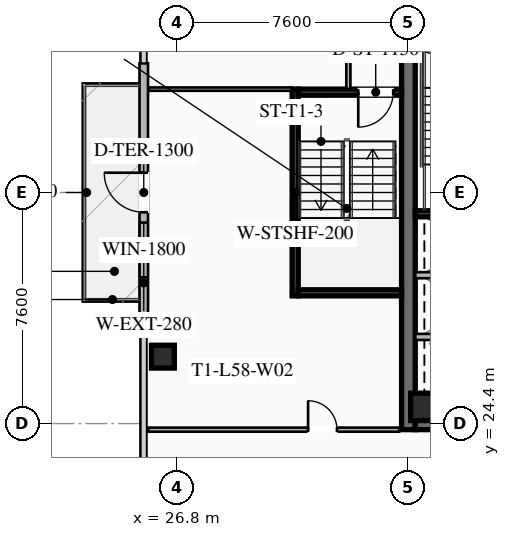
"""IFC4 building model, lengths in metres.
Left out: names, types, materials, properties, quantities, classifications, styles, units other than length and angle.
Written with IfcOpenShell. Run it as: python <this file> out.ifc"""

import sys

from ifc_helpers import new_model, si_unit, direction, frame, frame_2d, origin, origin_2d, place, context, subcontext, project, spatial, rectangle, hollow_rectangle, extrude, element, fill, save


model = new_model("IFC4")
c1 = context("Model", 3, precision=1e-05, world=origin(), true_north=direction((0.0, 1.0)))
c2 = subcontext(c1, "Body", "Model", "MODEL_VIEW")
j1 = project(units=[si_unit("LENGTHUNIT", "METRE"), si_unit("PLANEANGLEUNIT", "RADIAN")], contexts=[c1])
p1 = place(None, origin())
s1 = spatial("IfcSite", under=j1, at=p1, CompositionType="ELEMENT")
p2 = place(p1, origin())
s2 = spatial("IfcBuilding", under=s1, at=p2, CompositionType="ELEMENT")
p3 = place(p2, frame((0.0, 0.0, 214.85)))
s3 = spatial("IfcBuildingStorey", under=s2, at=p3, CompositionType="ELEMENT", Elevation=214.85)
p4 = place(p3, frame((34.425, 24.2, 0.0), z_axis=(0.0, 0.0, 1.0), x_axis=(0.0, 1.0, 0.0)))
e1 = element("IfcWall", 1, at=p4, inside=s3, PredefinedType="SHEAR", context=c2, shape_type="SweptSolid", body=[
    extrude(rectangle(XDim=15.6, YDim=0.45, at=frame_2d((7.8, 0.0))), origin(), (0.0, 0.0, 1.0), 3.55),
])
p5 = place(p3, frame((49.35, 24.425, 0.0), z_axis=(0.0, 0.0, 1.0), x_axis=(-1.0, 0.0, 0.0)))
e2 = element("IfcWall", 2, at=p5, inside=s3, PredefinedType="SHEAR", context=c2, shape_type="SweptSolid", body=[
    extrude(rectangle(XDim=14.7, YDim=0.45, at=frame_2d((7.35, 0.0))), origin(), (0.0, 0.0, 1.0), 3.55),
])
p6 = place(p5, frame((9.05, 0.0, 0.0)))
e3 = element("IfcOpeningElement", 3, at=p6, cuts=e2, PredefinedType="OPENING", context=c2, shape_type="SweptSolid", body=[
    extrude(rectangle(XDim=1.25, YDim=2.25, at=frame_2d((0.625, 1.125))), frame((0.0, 0.235, 0.0), z_axis=(0.0, -1.0, 0.0), x_axis=(1.0, 0.0, 0.0)), (0.0, 0.0, 1.0), 0.47),
])
p7 = place(p5, frame((4.0, 0.0, 0.0)))
e4 = element("IfcOpeningElement", 4, at=p7, cuts=e2, PredefinedType="OPENING", context=c2, shape_type="SweptSolid", body=[
    extrude(rectangle(XDim=1.25, YDim=2.25, at=frame_2d((0.625, 1.125))), frame((0.0, 0.235, 0.0), z_axis=(0.0, -1.0, 0.0), x_axis=(1.0, 0.0, 0.0)), (0.0, 0.0, 1.0), 0.47),
])
p8 = place(p3, frame((34.95, 24.95, 0.0), z_axis=(0.0, 0.0, 1.0), x_axis=(1.0, 0.0, 0.0)))
e5 = element("IfcColumn", 5, at=p8, inside=s3, PredefinedType="COLUMN", context=c2, shape_type="SweptSolid", body=[
    extrude(hollow_rectangle(XDim=0.9, YDim=0.9, WallThickness=0.04, at=origin_2d()), origin(), (0.0, 0.0, 1.0), 3.37),
])
p9 = place(p3, frame((26.35, 26.6, 0.0), z_axis=(0.0, 0.0, 1.0), x_axis=(1.0, 0.0, 0.0)))
e6 = element("IfcColumn", 6, at=p9, inside=s3, PredefinedType="COLUMN", context=c2, shape_type="SweptSolid", body=[
    extrude(hollow_rectangle(XDim=0.75, YDim=0.75, WallThickness=0.032, at=origin_2d()), origin(), (0.0, 0.0, 1.0), 3.37),
])
p10 = place(p3, frame((25.72, 27.75, 0.0), z_axis=(0.0, 0.0, 1.0), x_axis=(0.0, 1.0, 0.0)))
e7 = element("IfcWall", 7, at=p10, inside=s3, PredefinedType="SOLIDWALL", context=c2, shape_type="SweptSolid", body=[
    extrude(rectangle(XDim=8.5, YDim=0.28, at=frame_2d((4.25, 0.0))), origin(), (0.0, 0.0, 1.0), 3.37),
])
p11 = place(p10, frame((3.6, 0.0, 0.0)))
e8 = element("IfcOpeningElement", 8, at=p11, cuts=e7, PredefinedType="OPENING", context=c2, shape_type="SweptSolid", body=[
    extrude(rectangle(XDim=1.3, YDim=2.15, at=frame_2d((0.65, 1.075))), frame((0.0, 0.15, 0.0), z_axis=(0.0, -1.0, 0.0), x_axis=(1.0, 0.0, 0.0)), (0.0, 0.0, 1.0), 0.3),
])
p12 = place(p10, frame((1.46, 0.0, 0.85)))
e9 = element("IfcOpeningElement", 9, at=p12, cuts=e7, PredefinedType="OPENING", context=c2, shape_type="SweptSolid", body=[
    extrude(rectangle(XDim=1.8, YDim=1.92, at=frame_2d((0.9, 0.96))), frame((0.0, 0.15, 0.0), z_axis=(0.0, -1.0, 0.0), x_axis=(1.0, 0.0, 0.0)), (0.0, 0.0, 1.0), 0.3),
])
p13 = place(p3, frame((34.65, 31.3, 0.0), z_axis=(0.0, 0.0, 1.0), x_axis=(1.0, 0.0, 0.0)))
e10 = element("IfcWall", 10, at=p13, inside=s3, PredefinedType="SHEAR", context=c2, shape_type="SweptSolid", body=[
    extrude(rectangle(XDim=3.65, YDim=0.2, at=frame_2d((1.825, 0.0))), origin(), (0.0, 0.0, 1.0), 3.37),
])
for number, where, z_axis, x_axis in (
    (11, (34.65, 27.25, 0.0), (0.0, 0.0, 1.0), (1.0, 0.0, 0.0)),
    (12, (34.65, 29.28, 0.0), (0.0, 0.0, 1.0), (1.0, 0.0, 0.0)),
):
    element("IfcWall", number, at=place(p3, frame(where, z_axis=z_axis, x_axis=x_axis)), inside=s3, PredefinedType="SOLIDWALL", context=c2, shape_type="SweptSolid", body=[
        extrude(rectangle(XDim=3.3, YDim=0.2, at=frame_2d((1.65, 0.0))), origin(), (0.0, 0.0, 1.0), 3.37),
    ])
p14 = place(p3, frame((30.7, 28.6, 0.0), z_axis=(0.0, 0.0, 1.0), x_axis=(0.0, 1.0, 0.0)))
e13 = element("IfcWall", 13, at=p14, inside=s3, PredefinedType="SHEAR", context=c2, shape_type="SweptSolid", body=[
    extrude(rectangle(XDim=6.8, YDim=0.2, at=frame_2d((3.4, 0.0))), origin(), (0.0, 0.0, 1.0), 3.37),
])
p15 = place(p3, frame((34.2, 35.3, 0.0), z_axis=(0.0, 0.0, 1.0), x_axis=(-1.0, 0.0, 0.0)))
e14 = element("IfcWall", 14, at=p15, inside=s3, PredefinedType="SHEAR", context=c2, shape_type="SweptSolid", body=[
    extrude(rectangle(XDim=3.4, YDim=0.2, at=frame_2d((1.7, 0.0))), origin(), (0.0, 0.0, 1.0), 3.37),
])
p16 = place(p15, frame((0.275, 0.0, 0.0)))
e15 = element("IfcOpeningElement", 15, at=p16, cuts=e14, PredefinedType="OPENING", context=c2, shape_type="SweptSolid", body=[
    extrude(rectangle(XDim=1.15, YDim=2.2, at=frame_2d((0.575, 1.1))), frame((0.0, 0.11, 0.0), z_axis=(0.0, -1.0, 0.0), x_axis=(1.0, 0.0, 0.0)), (0.0, 0.0, 1.0), 0.22),
])
p17 = place(p3, frame((30.8, 28.7, 0.0), z_axis=(0.0, 0.0, 1.0), x_axis=(1.0, 0.0, 0.0)))
e16 = element("IfcWall", 16, at=p17, inside=s3, PredefinedType="SHEAR", context=c2, shape_type="SweptSolid", body=[
    extrude(rectangle(XDim=3.4, YDim=0.2, at=frame_2d((1.7, 0.0))), origin(), (0.0, 0.0, 1.0), 3.37),
])
p18 = place(p3, frame((32.45, 35.4, 0.0), z_axis=(0.0, 0.0, 1.0), x_axis=(0.0, 1.0, 0.0)))
e17 = element("IfcWall", 17, at=p18, inside=s3, PredefinedType="PARTITIONING", context=c2, shape_type="SweptSolid", body=[
    extrude(rectangle(XDim=4.4, YDim=0.135, at=frame_2d((2.2, 0.0))), origin(), (0.0, 0.0, 1.0), 2.723),
])
p19 = place(p3, frame((25.87, 24.2, 0.0), z_axis=(0.0, 0.0, 1.0), x_axis=(1.0, 0.0, 0.0)))
e18 = element("IfcWall", 18, at=p19, inside=s3, PredefinedType="PARTITIONING", context=c2, shape_type="SweptSolid", body=[
    extrude(rectangle(XDim=8.25, YDim=0.135, at=frame_2d((4.125, 0.0))), origin(), (0.0, 0.0, 1.0), 2.723),
])
p20 = place(p19, frame((5.255, 0.0, 0.0)))
e19 = element("IfcOpeningElement", 19, at=p20, cuts=e18, PredefinedType="OPENING", context=c2, shape_type="SweptSolid", body=[
    extrude(rectangle(XDim=0.95, YDim=2.05, at=frame_2d((0.475, 1.025))), frame((0.0, 0.077, 0.0), z_axis=(0.0, -1.0, 0.0), x_axis=(1.0, 0.0, 0.0)), (0.0, 0.0, 1.0), 0.155),
])
p21 = place(p3, frame((30.6, 35.4, 0.0), z_axis=(0.0, 0.0, 1.0), x_axis=(-1.0, 0.0, 0.0)))
e20 = element("IfcWall", 20, at=p21, inside=s3, PredefinedType="PARTITIONING", context=c2, shape_type="SweptSolid", body=[
    extrude(rectangle(XDim=4.73, YDim=0.11, at=frame_2d((2.365, 0.0))), origin(), (0.0, 0.0, 1.0), 2.723),
])
p22 = place(p11, origin())
e21 = element("IfcDoor", 21, at=p22, inside=s3, OperationType="SINGLE_SWING_RIGHT", PredefinedType="DOOR", context=c2, shape_type="SweptSolid", body=[
    extrude(rectangle(XDim=1.3, YDim=2.15, at=frame_2d((0.65, 1.075))), frame((0.0, 0.025, 0.0), z_axis=(0.0, -1.0, 0.0), x_axis=(1.0, 0.0, 0.0)), (0.0, 0.0, 1.0), 0.05),
])
fill(e8, e21)
p23 = place(p12, origin())
e22 = element("IfcWindow", 22, at=p23, inside=s3, PartitioningType="SINGLE_PANEL", PredefinedType="WINDOW", context=c2, shape_type="SweptSolid", body=[
    extrude(rectangle(XDim=1.8, YDim=1.92, at=frame_2d((0.9, 0.96))), frame((0.0, 0.03, 0.0), z_axis=(0.0, -1.0, 0.0), x_axis=(1.0, 0.0, 0.0)), (0.0, 0.0, 1.0), 0.06),
])
fill(e9, e22)
p24 = place(p16, origin())
e23 = element("IfcDoor", 23, at=p24, inside=s3, OperationType="SINGLE_SWING_RIGHT", PredefinedType="DOOR", context=c2, shape_type="SweptSolid", body=[
    extrude(rectangle(XDim=1.15, YDim=2.2, at=frame_2d((0.575, 1.1))), frame((0.0, 0.025, 0.0), z_axis=(0.0, -1.0, 0.0), x_axis=(1.0, 0.0, 0.0)), (0.0, 0.0, 1.0), 0.05),
])
fill(e15, e23)
p25 = place(p20, origin())
e24 = element("IfcDoor", 24, at=p25, inside=s3, OperationType="SINGLE_SWING_LEFT", PredefinedType="DOOR", context=c2, shape_type="SweptSolid", body=[
    extrude(rectangle(XDim=0.95, YDim=2.05, at=frame_2d((0.475, 1.025))), frame((0.0, 0.025, 0.0), z_axis=(0.0, -1.0, 0.0), x_axis=(1.0, 0.0, 0.0)), (0.0, 0.0, 1.0), 0.05),
])
fill(e19, e24)
save(model, sys.argv[1])
